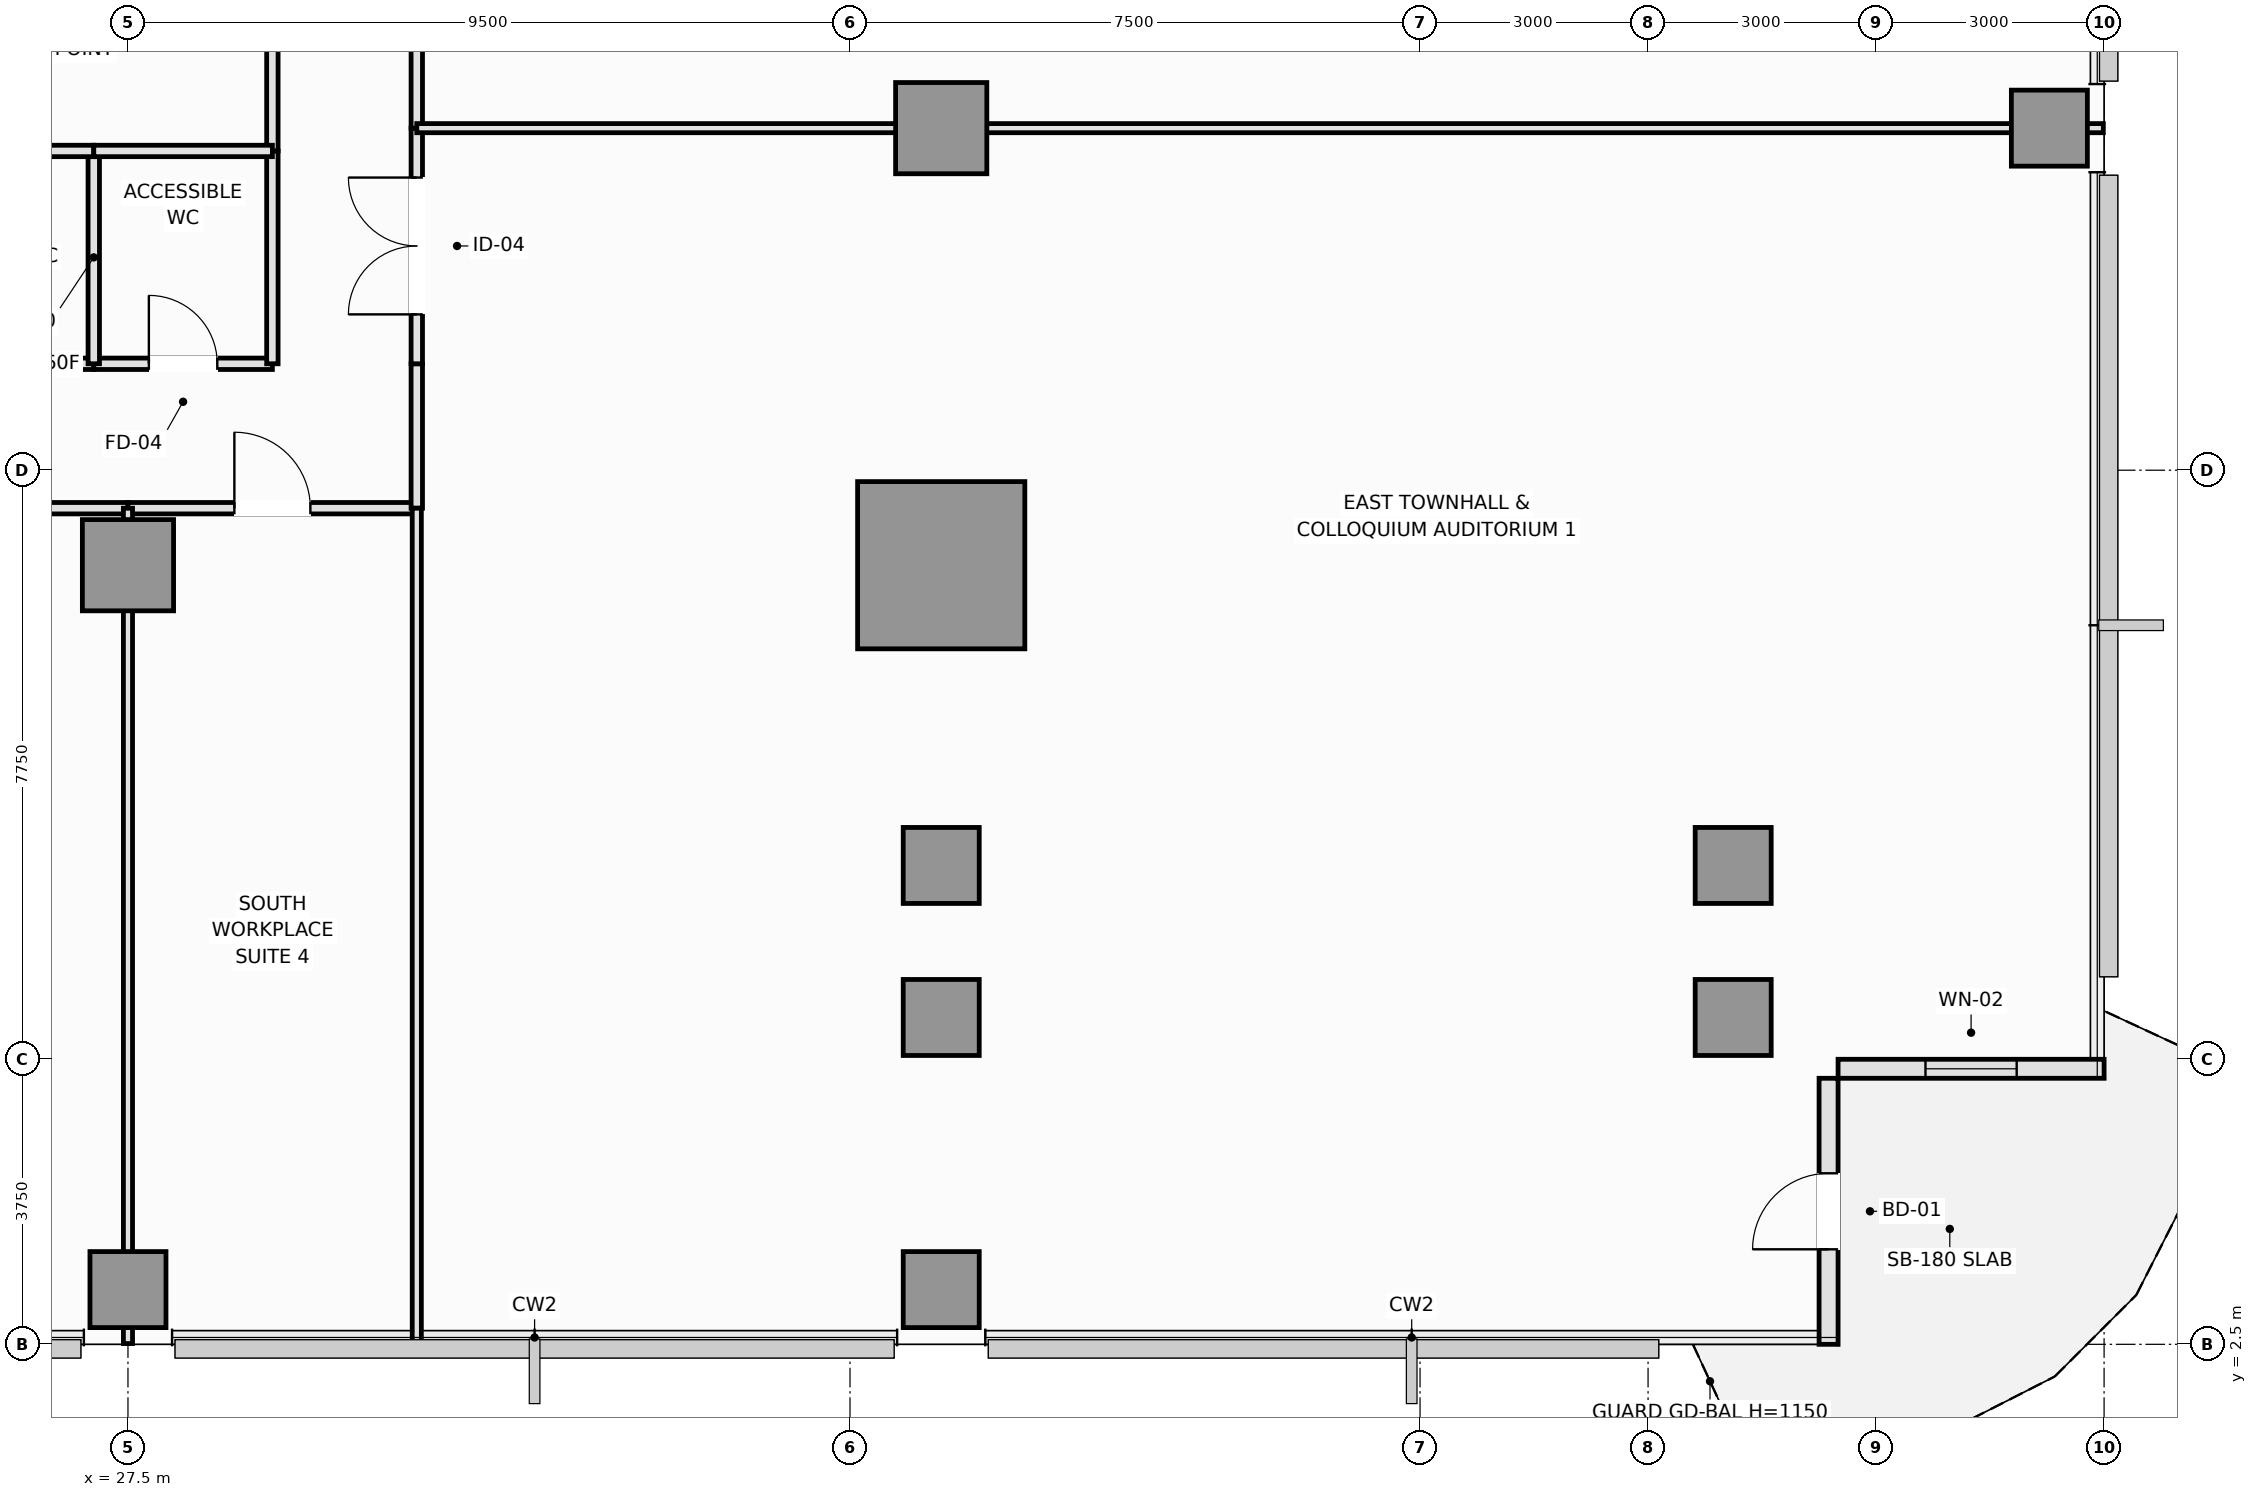
"""IFC4 building model, lengths in metres.
Left out: names, types, materials, properties, quantities, classifications, styles, units other than length and angle.
Written with IfcOpenShell. Run it as: python <this file> out.ifc"""

import sys

from ifc_helpers import new_model, si_unit, direction, frame, frame_2d, origin, origin_2d, place, context, subcontext, project, spatial, rectangle, extrude, element, fill, save


model = new_model("IFC4")
c1 = context("Model", 3, precision=1e-05, world=origin(), true_north=direction((0.0, 1.0)))
c2 = subcontext(c1, "Body", "Model", "MODEL_VIEW")
j1 = project(units=[si_unit("LENGTHUNIT", "METRE"), si_unit("PLANEANGLEUNIT", "RADIAN")], contexts=[c1])
p1 = place(None, origin())
s1 = spatial("IfcSite", under=j1, at=p1, CompositionType="ELEMENT")
p2 = place(p1, origin())
s2 = spatial("IfcBuilding", under=s1, at=p2, CompositionType="ELEMENT")
p3 = place(p2, frame((0.0, 0.0, 85.95)))
s3 = spatial("IfcBuildingStorey", under=s2, at=p3, CompositionType="ELEMENT", Elevation=85.95)
p4 = place(p3, frame((38.2, 12.75, 0.0), z_axis=(0.0, 0.0, 1.0), x_axis=(1.0, 0.0, 0.0)))
e1 = element("IfcColumn", 1, at=p4, inside=s3, PredefinedType="COLUMN", context=c2, shape_type="SweptSolid", body=[
    extrude(rectangle(XDim=2.2, YDim=2.2, at=origin_2d()), origin(), (0.0, 0.0, 1.0), 3.55),
])
for number, where, z_axis, x_axis in (
    (2, (27.5, 12.75, 0.0), (0.0, 0.0, 1.0), (1.0, 0.0, 0.0)),
    (3, (38.2, 18.5, 0.0), (0.0, 0.0, 1.0), (1.0, 0.0, 0.0)),
):
    element("IfcColumn", number, at=place(p3, frame(where, z_axis=z_axis, x_axis=x_axis)), inside=s3, PredefinedType="COLUMN", context=c2, shape_type="SweptSolid", body=[
        extrude(rectangle(XDim=1.2, YDim=1.2, at=origin_2d()), origin(), (0.0, 0.0, 1.0), 3.55),
    ])
for number, where, z_axis, x_axis in (
    (4, (48.62, 6.8, 0.0), (0.0, 0.0, 1.0), (1.0, 0.0, 0.0)),
    (5, (38.2, 6.8, 0.0), (0.0, 0.0, 1.0), (1.0, 0.0, 0.0)),
    (6, (38.2, 8.8, 0.0), (0.0, 0.0, 1.0), (1.0, 0.0, 0.0)),
    (7, (48.62, 8.8, 0.0), (0.0, 0.0, 1.0), (1.0, 0.0, 0.0)),
    (8, (52.78, 18.5, 0.0), (0.0, 0.0, 1.0), (1.0, 0.0, 0.0)),
    (9, (27.5, 3.22, 0.0), (0.0, 0.0, 1.0), (1.0, 0.0, 0.0)),
    (10, (38.2, 3.22, 0.0), (0.0, 0.0, 1.0), (1.0, 0.0, 0.0)),
):
    element("IfcColumn", number, at=place(p3, frame(where, z_axis=z_axis, x_axis=x_axis)), inside=s3, PredefinedType="COLUMN", context=c2, shape_type="SweptSolid", body=[
        extrude(rectangle(XDim=1.0, YDim=1.0, at=origin_2d()), origin(), (0.0, 0.0, 1.0), 3.55),
    ])
p5 = place(p3, frame((49.875, 2.5, 0.0), z_axis=(0.0, 0.0, 1.0), x_axis=(0.0, 1.0, 0.0)))
e11 = element("IfcWall", 11, at=p5, inside=s3, PredefinedType="SOLIDWALL", context=c2, shape_type="SweptSolid", body=[
    extrude(rectangle(XDim=3.5, YDim=0.25, at=frame_2d((1.75, 0.0))), origin(), (0.0, 0.0, 1.0), 3.07),
])
p6 = place(p5, frame((1.25, 0.0, 0.0)))
e12 = element("IfcOpeningElement", 12, at=p6, cuts=e11, PredefinedType="OPENING", context=c2, shape_type="SweptSolid", body=[
    extrude(rectangle(XDim=1.0, YDim=2.2, at=frame_2d((0.5, 1.1))), frame((0.0, 0.135, 0.0), z_axis=(0.0, -1.0, 0.0), x_axis=(1.0, 0.0, 0.0)), (0.0, 0.0, 1.0), 0.27),
])
p7 = place(p3, frame((50.0, 6.125, 0.0), z_axis=(0.0, 0.0, 1.0), x_axis=(1.0, 0.0, 0.0)))
e13 = element("IfcWall", 13, at=p7, inside=s3, PredefinedType="SOLIDWALL", context=c2, shape_type="SweptSolid", body=[
    extrude(rectangle(XDim=3.5, YDim=0.25, at=frame_2d((1.75, 0.0))), origin(), (0.0, 0.0, 1.0), 3.07),
])
p8 = place(p7, frame((1.15, 0.0, 0.9)))
e14 = element("IfcOpeningElement", 14, at=p8, cuts=e13, PredefinedType="OPENING", context=c2, shape_type="SweptSolid", body=[
    extrude(rectangle(XDim=1.2, YDim=1.8, at=frame_2d((0.6, 0.9))), frame((0.0, 0.135, 0.0), z_axis=(0.0, -1.0, 0.0), x_axis=(1.0, 0.0, 0.0)), (0.0, 0.0, 1.0), 0.27),
])
p9 = place(p3, frame((24.45, 15.4, 0.0), z_axis=(0.0, 0.0, 1.0), x_axis=(1.0, 0.0, 0.0)))
e15 = element("IfcWall", 15, at=p9, inside=s3, PredefinedType="PLUMBINGWALL", context=c2, shape_type="SweptSolid", body=[
    extrude(rectangle(XDim=2.6, YDim=0.15, at=frame_2d((1.3, 0.0))), origin(), (0.0, 0.0, 1.0), 3.37),
])
p10 = place(p3, frame((27.05, 15.4, 0.0), z_axis=(0.0, 0.0, 1.0), x_axis=(1.0, 0.0, 0.0)))
e16 = element("IfcWall", 16, at=p10, inside=s3, PredefinedType="PLUMBINGWALL", context=c2, shape_type="SweptSolid", body=[
    extrude(rectangle(XDim=2.35, YDim=0.15, at=frame_2d((1.175, 0.0))), origin(), (0.0, 0.0, 1.0), 3.37),
])
p11 = place(p10, frame((0.725, 0.0, 0.0)))
e17 = element("IfcOpeningElement", 17, at=p11, cuts=e16, PredefinedType="OPENING", context=c2, shape_type="SweptSolid", body=[
    extrude(rectangle(XDim=0.9, YDim=2.1, at=frame_2d((0.45, 1.05))), frame((0.0, 0.085, 0.0), z_axis=(0.0, -1.0, 0.0), x_axis=(1.0, 0.0, 0.0)), (0.0, 0.0, 1.0), 0.17),
])
p12 = place(p3, frame((23.6, 13.5, 0.0), z_axis=(0.0, 0.0, 1.0), x_axis=(1.0, 0.0, 0.0)))
e18 = element("IfcWall", 18, at=p12, inside=s3, PredefinedType="PARTITIONING", context=c2, shape_type="SweptSolid", body=[
    extrude(rectangle(XDim=3.9, YDim=0.15, at=frame_2d((1.95, 0.0))), origin(), (0.0, 0.0, 1.0), 3.37),
])
p13 = place(p12, frame((1.45, 0.0, 0.0)))
e19 = element("IfcOpeningElement", 19, at=p13, cuts=e18, PredefinedType="OPENING", context=c2, shape_type="SweptSolid", body=[
    extrude(rectangle(XDim=1.0, YDim=2.15, at=frame_2d((0.5, 1.075))), frame((0.0, 0.085, 0.0), z_axis=(0.0, -1.0, 0.0), x_axis=(1.0, 0.0, 0.0)), (0.0, 0.0, 1.0), 0.17),
])
p14 = place(p3, frame((27.5, 13.5, 0.0), z_axis=(0.0, 0.0, 1.0), x_axis=(1.0, 0.0, 0.0)))
e20 = element("IfcWall", 20, at=p14, inside=s3, PredefinedType="PARTITIONING", context=c2, shape_type="SweptSolid", body=[
    extrude(rectangle(XDim=3.8, YDim=0.15, at=frame_2d((1.9, 0.0))), origin(), (0.0, 0.0, 1.0), 3.37),
])
p15 = place(p14, frame((1.4, 0.0, 0.0)))
e21 = element("IfcOpeningElement", 21, at=p15, cuts=e20, PredefinedType="OPENING", context=c2, shape_type="SweptSolid", body=[
    extrude(rectangle(XDim=1.0, YDim=2.15, at=frame_2d((0.5, 1.075))), frame((0.0, 0.085, 0.0), z_axis=(0.0, -1.0, 0.0), x_axis=(1.0, 0.0, 0.0)), (0.0, 0.0, 1.0), 0.17),
])
p16 = place(p3, frame((31.3, 13.5, 0.0), z_axis=(0.0, 0.0, 1.0), x_axis=(0.0, 1.0, 0.0)))
e22 = element("IfcWall", 22, at=p16, inside=s3, PredefinedType="PARTITIONING", context=c2, shape_type="SweptSolid", body=[
    extrude(rectangle(XDim=1.9, YDim=0.15, at=frame_2d((0.95, 0.0))), origin(), (0.0, 0.0, 1.0), 3.37),
])
p17 = place(p3, frame((29.4, 15.4, 0.0), z_axis=(0.0, 0.0, 1.0), x_axis=(0.0, 1.0, 0.0)))
e23 = element("IfcWall", 23, at=p17, inside=s3, PredefinedType="PLUMBINGWALL", context=c2, shape_type="SweptSolid", body=[
    extrude(rectangle(XDim=2.8, YDim=0.15, at=frame_2d((1.4, 0.0))), origin(), (0.0, 0.0, 1.0), 3.37),
])
p18 = place(p3, frame((29.4, 18.2, 0.0), z_axis=(0.0, 0.0, 1.0), x_axis=(0.0, 1.0, 0.0)))
e24 = element("IfcWall", 24, at=p18, inside=s3, PredefinedType="PARTITIONING", context=c2, shape_type="SweptSolid", body=[
    extrude(rectangle(XDim=3.0, YDim=0.15, at=frame_2d((1.5, 0.0))), origin(), (0.0, 0.0, 1.0), 3.37),
])
p19 = place(p3, frame((31.3, 15.4, 0.0), z_axis=(0.0, 0.0, 1.0), x_axis=(0.0, 1.0, 0.0)))
e25 = element("IfcWall", 25, at=p19, inside=s3, PredefinedType="PARTITIONING", context=c2, shape_type="SweptSolid", body=[
    extrude(rectangle(XDim=3.1, YDim=0.15, at=frame_2d((1.55, 0.0))), origin(), (0.0, 0.0, 1.0), 3.37),
])
p20 = place(p19, frame((0.65, 0.0, 0.0)))
e26 = element("IfcOpeningElement", 26, at=p20, cuts=e25, PredefinedType="OPENING", context=c2, shape_type="SweptSolid", body=[
    extrude(rectangle(XDim=1.8, YDim=2.2, at=frame_2d((0.9, 1.1))), frame((0.0, 0.085, 0.0), z_axis=(0.0, -1.0, 0.0), x_axis=(1.0, 0.0, 0.0)), (0.0, 0.0, 1.0), 0.17),
])
p21 = place(p3, frame((31.3, 18.5, 0.0), z_axis=(0.0, 0.0, 1.0), x_axis=(0.0, 1.0, 0.0)))
e27 = element("IfcWall", 27, at=p21, inside=s3, PredefinedType="PARTITIONING", context=c2, shape_type="SweptSolid", body=[
    extrude(rectangle(XDim=16.6, YDim=0.15, at=frame_2d((8.3, 0.0))), origin(), (0.0, 0.0, 1.0), 3.37),
])
p22 = place(p21, frame((7.4, 0.0, 0.0)))
e28 = element("IfcOpeningElement", 28, at=p22, cuts=e27, PredefinedType="OPENING", context=c2, shape_type="SweptSolid", body=[
    extrude(rectangle(XDim=1.8, YDim=2.2, at=frame_2d((0.9, 1.1))), frame((0.0, 0.085, 0.0), z_axis=(0.0, -1.0, 0.0), x_axis=(1.0, 0.0, 0.0)), (0.0, 0.0, 1.0), 0.17),
])
p23 = place(p3, frame((27.05, 15.4, 0.0), z_axis=(0.0, 0.0, 1.0), x_axis=(0.0, 1.0, 0.0)))
e29 = element("IfcWall", 29, at=p23, inside=s3, PredefinedType="PLUMBINGWALL", context=c2, shape_type="SweptSolid", body=[
    extrude(rectangle(XDim=2.8, YDim=0.15, at=frame_2d((1.4, 0.0))), origin(), (0.0, 0.0, 1.0), 3.37),
])
p24 = place(p3, frame((24.45, 18.2, 0.0), z_axis=(0.0, 0.0, 1.0), x_axis=(1.0, 0.0, 0.0)))
e30 = element("IfcWall", 30, at=p24, inside=s3, PredefinedType="PLUMBINGWALL", context=c2, shape_type="SweptSolid", body=[
    extrude(rectangle(XDim=2.6, YDim=0.15, at=frame_2d((1.3, 0.0))), origin(), (0.0, 0.0, 1.0), 3.37),
])
p25 = place(p3, frame((27.05, 18.2, 0.0), z_axis=(0.0, 0.0, 1.0), x_axis=(1.0, 0.0, 0.0)))
e31 = element("IfcWall", 31, at=p25, inside=s3, PredefinedType="PLUMBINGWALL", context=c2, shape_type="SweptSolid", body=[
    extrude(rectangle(XDim=2.35, YDim=0.15, at=frame_2d((1.175, 0.0))), origin(), (0.0, 0.0, 1.0), 3.37),
])
p26 = place(p3, frame((27.5, 2.51, 0.0), z_axis=(0.0, 0.0, 1.0), x_axis=(0.0, 1.0, 0.0)))
e32 = element("IfcWall", 32, at=p26, inside=s3, PredefinedType="PARTITIONING", context=c2, shape_type="SweptSolid", body=[
    extrude(rectangle(XDim=10.99, YDim=0.12, at=frame_2d((5.495, 0.0))), origin(), (0.0, 0.0, 1.0), 2.82),
])
p27 = place(p3, frame((31.3, 2.51, 0.0), z_axis=(0.0, 0.0, 1.0), x_axis=(0.0, 1.0, 0.0)))
e33 = element("IfcWall", 33, at=p27, inside=s3, PredefinedType="PARTITIONING", context=c2, shape_type="SweptSolid", body=[
    extrude(rectangle(XDim=10.99, YDim=0.12, at=frame_2d((5.495, 0.0))), origin(), (0.0, 0.0, 1.0), 3.37),
])
p28 = place(p3, frame((31.3, 18.5, 0.0), z_axis=(0.0, 0.0, 1.0), x_axis=(1.0, 0.0, 0.0)))
e34 = element("IfcWall", 34, at=p28, inside=s3, PredefinedType="PARTITIONING", context=c2, shape_type="SweptSolid", body=[
    extrude(rectangle(XDim=22.19, YDim=0.12, at=frame_2d((11.095, 0.0))), origin(), (0.0, 0.0, 1.0), 2.72),
])
p29 = place(p6, frame((1.0, 0.0, 0.0), z_axis=(0.0, 0.0, 1.0), x_axis=(-1.0, 0.0, 0.0)))
e35 = element("IfcDoor", 35, at=p29, inside=s3, OperationType="SINGLE_SWING_LEFT", PredefinedType="DOOR", context=c2, shape_type="SweptSolid", body=[
    extrude(rectangle(XDim=1.0, YDim=2.2, at=frame_2d((0.5, 1.1))), frame((0.0, 0.025, 0.0), z_axis=(0.0, -1.0, 0.0), x_axis=(1.0, 0.0, 0.0)), (0.0, 0.0, 1.0), 0.05),
])
fill(e12, e35)
p30 = place(p8, origin())
e36 = element("IfcWindow", 36, at=p30, inside=s3, PartitioningType="SINGLE_PANEL", PredefinedType="WINDOW", context=c2, shape_type="SweptSolid", body=[
    extrude(rectangle(XDim=1.2, YDim=1.8, at=frame_2d((0.6, 0.9))), frame((0.0, 0.03, 0.0), z_axis=(0.0, -1.0, 0.0), x_axis=(1.0, 0.0, 0.0)), (0.0, 0.0, 1.0), 0.06),
])
fill(e14, e36)
p31 = place(p11, origin())
e37 = element("IfcDoor", 37, at=p31, inside=s3, OperationType="SINGLE_SWING_LEFT", PredefinedType="DOOR", context=c2, shape_type="SweptSolid", body=[
    extrude(rectangle(XDim=0.9, YDim=2.1, at=frame_2d((0.45, 1.05))), frame((0.0, 0.025, 0.0), z_axis=(0.0, -1.0, 0.0), x_axis=(1.0, 0.0, 0.0)), (0.0, 0.0, 1.0), 0.05),
])
fill(e17, e37)
p32 = place(p15, origin())
e38 = element("IfcDoor", 38, at=p32, inside=s3, OperationType="SINGLE_SWING_LEFT", PredefinedType="DOOR", context=c2, shape_type="SweptSolid", body=[
    extrude(rectangle(XDim=1.0, YDim=2.15, at=frame_2d((0.5, 1.075))), frame((0.0, 0.025, 0.0), z_axis=(0.0, -1.0, 0.0), x_axis=(1.0, 0.0, 0.0)), (0.0, 0.0, 1.0), 0.05),
])
fill(e21, e38)
p33 = place(p20, origin())
e39 = element("IfcDoor", 39, at=p33, inside=s3, OperationType="DOUBLE_DOOR_SINGLE_SWING", PredefinedType="DOOR", context=c2, shape_type="SweptSolid", body=[
    extrude(rectangle(XDim=1.8, YDim=2.2, at=frame_2d((0.9, 1.1))), frame((0.0, 0.025, 0.0), z_axis=(0.0, -1.0, 0.0), x_axis=(1.0, 0.0, 0.0)), (0.0, 0.0, 1.0), 0.05),
])
fill(e26, e39)
save(model, sys.argv[1])
